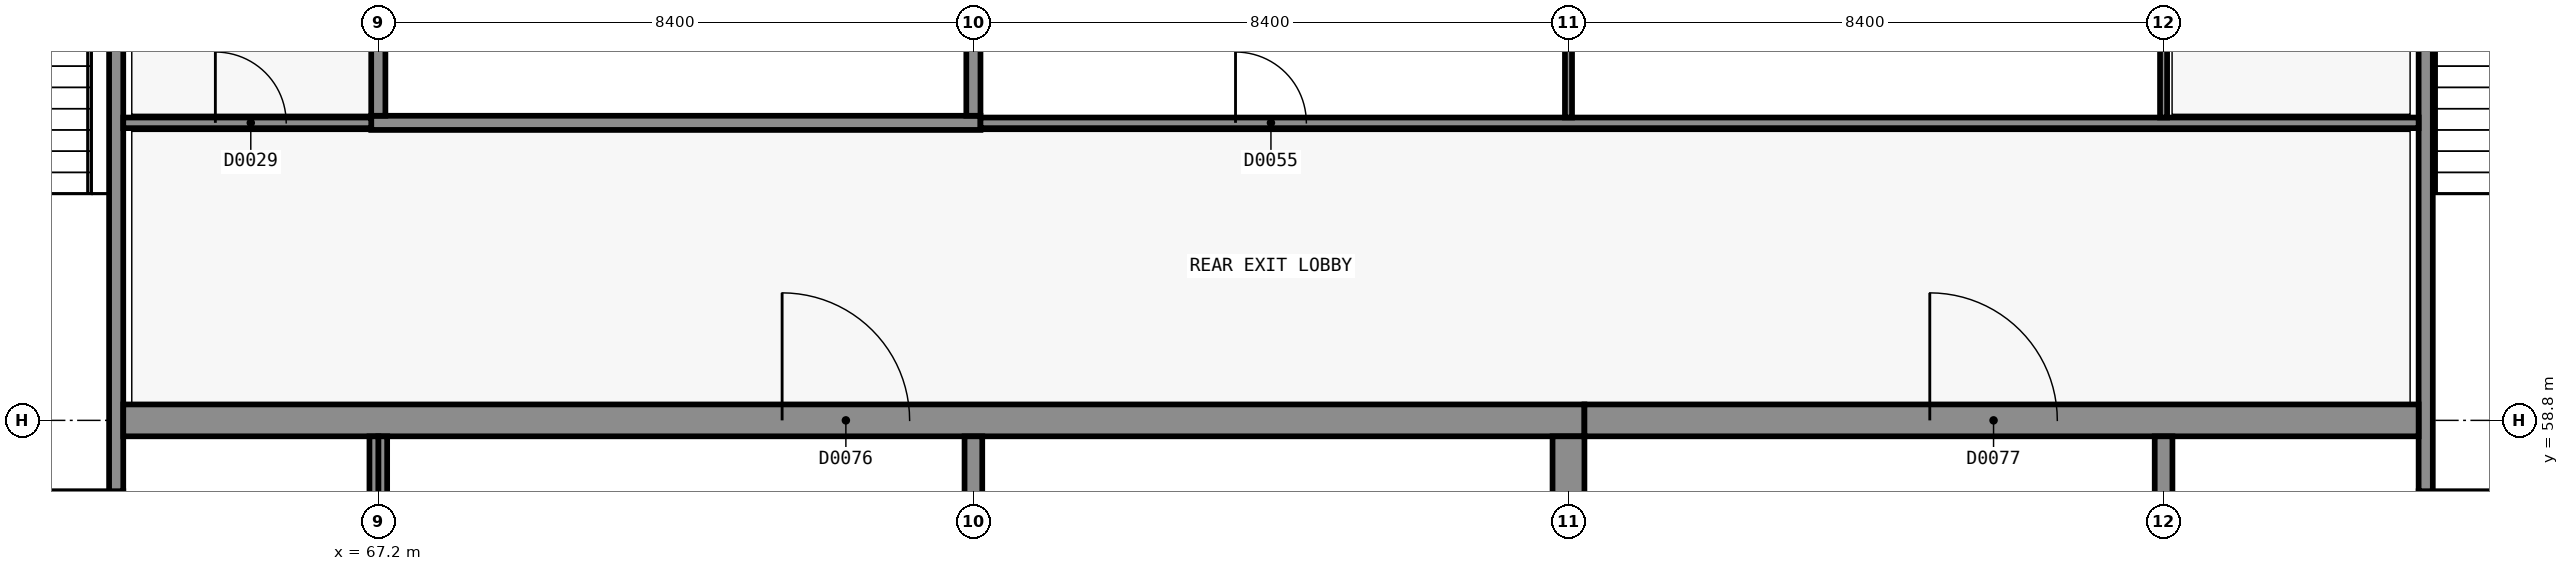
"""IFC4 building model, lengths in metres.
Left out: names, types, materials, properties, quantities, classifications, styles, units other than length and angle.
Written with IfcOpenShell. Run it as: python <this file> out.ifc"""

import sys

from ifc_helpers import new_model, si_unit, direction, frame, frame_2d, origin, place, context, subcontext, project, spatial, polyline, rectangle, outline, extrude, element, fill, save


model = new_model("IFC4")
c1 = context("Model", 3, precision=1e-05, world=origin(), true_north=direction((0.0, 1.0)))
c2 = subcontext(c1, "Body", "Model", "MODEL_VIEW")
j1 = project(units=[si_unit("LENGTHUNIT", "METRE"), si_unit("PLANEANGLEUNIT", "RADIAN")], contexts=[c1])
p1 = place(None, origin())
s1 = spatial("IfcSite", under=j1, at=p1, CompositionType="ELEMENT")
p2 = place(p1, origin())
s2 = spatial("IfcBuilding", under=s1, at=p2, CompositionType="ELEMENT")
p3 = place(p2, origin())
s3 = spatial("IfcBuildingStorey", under=s2, at=p3, CompositionType="ELEMENT", Elevation=0.0)
p4 = place(p3, frame((63.5, 67.0, -0.3), z_axis=(0.0, 0.0, 1.0), x_axis=(0.0, -1.0, 0.0)))
e1 = element("IfcWall", 1, at=p4, inside=s3, PredefinedType="SHEAR", context=c2, shape_type="SweptSolid", body=[
    extrude(rectangle(XDim=9.2, YDim=0.2, at=frame_2d((4.6, 0.0))), origin(), (0.0, 0.0, 1.0), 5.7),
])
p5 = place(p4, frame((0.95, 0.0, 0.3)))
e2 = element("IfcOpeningElement", 2, at=p5, cuts=e1, PredefinedType="OPENING", context=c2, shape_type="SweptSolid", body=[
    extrude(rectangle(XDim=1.2, YDim=2.1, at=frame_2d((0.6, 1.05))), frame((0.0, 0.11, 0.0), z_axis=(0.0, -1.0, 0.0), x_axis=(1.0, 0.0, 0.0)), (0.0, 0.0, 1.0), 0.22),
])
p6 = place(p3, frame((96.1, 57.8, -0.3), z_axis=(0.0, 0.0, 1.0), x_axis=(0.0, 1.0, 0.0)))
e3 = element("IfcWall", 3, at=p6, inside=s3, PredefinedType="SHEAR", context=c2, shape_type="SweptSolid", body=[
    extrude(rectangle(XDim=9.2, YDim=0.2, at=frame_2d((4.6, 0.0))), origin(), (0.0, 0.0, 1.0), 5.7),
])
p7 = place(p6, frame((7.05, 0.0, 0.3)))
e4 = element("IfcOpeningElement", 4, at=p7, cuts=e3, PredefinedType="OPENING", context=c2, shape_type="SweptSolid", body=[
    extrude(rectangle(XDim=1.2, YDim=2.1, at=frame_2d((0.6, 1.05))), frame((0.0, 0.11, 0.0), z_axis=(0.0, -1.0, 0.0), x_axis=(1.0, 0.0, 0.0)), (0.0, 0.0, 1.0), 0.22),
])
p8 = place(p3, frame((63.6, 58.8, -0.3), z_axis=(0.0, 0.0, 1.0), x_axis=(1.0, 0.0, 0.0)))
e5 = element("IfcWall", 5, at=p8, inside=s3, PredefinedType="SHEAR", context=c2, shape_type="SweptSolid", body=[
    extrude(rectangle(XDim=20.625, YDim=0.45, at=frame_2d((10.312, 0.0))), origin(), (0.0, 0.0, 1.0), 5.7),
])
p9 = place(p8, frame((9.3, 0.0, 0.3)))
e6 = element("IfcOpeningElement", 6, at=p9, cuts=e5, PredefinedType="OPENING", context=c2, shape_type="SweptSolid", body=[
    extrude(rectangle(XDim=1.8, YDim=2.1, at=frame_2d((0.9, 1.05))), frame((0.0, 0.235, 0.0), z_axis=(0.0, -1.0, 0.0), x_axis=(1.0, 0.0, 0.0)), (0.0, 0.0, 1.0), 0.47),
])
p10 = place(p3, frame((84.0, 58.575, -0.3), z_axis=(0.0, 0.0, 1.0), x_axis=(0.0, -1.0, 0.0)))
e7 = element("IfcWall", 7, at=p10, inside=s3, PredefinedType="SHEAR", context=c2, shape_type="SweptSolid", body=[
    extrude(rectangle(XDim=24.75, YDim=0.45, at=frame_2d((12.375, 0.0))), origin(), (0.0, 0.0, 1.0), 5.7),
])
p11 = place(p3, frame((84.225, 58.8, -0.3), z_axis=(0.0, 0.0, 1.0), x_axis=(1.0, 0.0, 0.0)))
e8 = element("IfcWall", 8, at=p11, inside=s3, PredefinedType="SHEAR", context=c2, shape_type="SweptSolid", body=[
    extrude(rectangle(XDim=11.775, YDim=0.45, at=frame_2d((5.887, 0.0))), origin(), (0.0, 0.0, 1.0), 5.7),
])
p12 = place(p11, frame((4.875, 0.0, 0.3)))
e9 = element("IfcOpeningElement", 9, at=p12, cuts=e8, PredefinedType="OPENING", context=c2, shape_type="SweptSolid", body=[
    extrude(rectangle(XDim=1.8, YDim=2.1, at=frame_2d((0.9, 1.05))), frame((0.0, 0.235, 0.0), z_axis=(0.0, -1.0, 0.0), x_axis=(1.0, 0.0, 0.0)), (0.0, 0.0, 1.0), 0.47),
])
p13 = place(p3, frame((67.262, 34.7, -0.3), z_axis=(0.0, 0.0, 1.0), x_axis=(0.0, 1.0, 0.0)))
e10 = element("IfcWall", 10, at=p13, inside=s3, PredefinedType="SOLIDWALL", context=c2, shape_type="SweptSolid", body=[
    extrude(outline(polyline([(0.0, 0.0), (23.875, 0.0), (23.875, 3.497), (0.0, 0.154), (0.0, 0.0)])), frame((0.0, 0.062, 0.0), z_axis=(0.0, -1.0, 0.0), x_axis=(1.0, 0.0, 0.0)), (0.0, 0.0, 1.0), 0.125),
])
p14 = place(p3, frame((67.137, 34.8, -0.3), z_axis=(0.0, 0.0, 1.0), x_axis=(0.0, 1.0, 0.0)))
e11 = element("IfcWall", 11, at=p14, inside=s3, PredefinedType="SOLIDWALL", context=c2, shape_type="SweptSolid", body=[
    extrude(outline(polyline([(0.0, 0.0), (23.775, 0.0), (23.775, 3.497), (0.0, 0.168), (0.0, 0.0)])), frame((0.0, 0.062, 0.0), z_axis=(0.0, -1.0, 0.0), x_axis=(1.0, 0.0, 0.0)), (0.0, 0.0, 1.0), 0.125),
])
for number, where, z_axis, x_axis in (
    (12, (75.6, 34.7, -0.3), (0.0, 0.0, 1.0), (0.0, 1.0, 0.0)),
    (13, (92.4, 34.7, -0.3), (0.0, 0.0, 1.0), (0.0, 1.0, 0.0)),
):
    element("IfcWall", number, at=place(p3, frame(where, z_axis=z_axis, x_axis=x_axis)), inside=s3, PredefinedType="SOLIDWALL", context=c2, shape_type="SweptSolid", body=[
        extrude(outline(polyline([(0.0, 0.0), (23.875, 0.0), (23.875, 3.497), (0.0, 0.154), (0.0, 0.0)])), frame((0.0, 0.125, 0.0), z_axis=(0.0, -1.0, 0.0), x_axis=(1.0, 0.0, 0.0)), (0.0, 0.0, 1.0), 0.25),
    ])
p15 = place(p3, frame((67.1, 63.0, 0.0), z_axis=(0.0, 0.0, 1.0), x_axis=(1.0, 0.0, 0.0)))
e14 = element("IfcWall", 14, at=p15, inside=s3, PredefinedType="SOLIDWALL", context=c2, shape_type="SweptSolid", body=[
    extrude(rectangle(XDim=8.6, YDim=0.2, at=frame_2d((4.3, 0.0))), origin(), (0.0, 0.0, 1.0), 4.4),
])
p16 = place(p3, frame((67.2, 63.1, 0.0), z_axis=(0.0, 0.0, 1.0), x_axis=(0.0, 1.0, 0.0)))
e15 = element("IfcWall", 15, at=p16, inside=s3, PredefinedType="SOLIDWALL", context=c2, shape_type="SweptSolid", body=[
    extrude(rectangle(XDim=3.5, YDim=0.2, at=frame_2d((1.75, 0.0))), origin(), (0.0, 0.0, 1.0), 4.4),
])
p17 = place(p16, frame((1.4, 0.0, 0.0)))
e16 = element("IfcOpeningElement", 16, at=p17, cuts=e15, PredefinedType="OPENING", context=c2, shape_type="SweptSolid", body=[
    extrude(rectangle(XDim=1.2, YDim=2.1, at=frame_2d((0.6, 1.05))), frame((0.0, 0.11, 0.0), z_axis=(0.0, -1.0, 0.0), x_axis=(1.0, 0.0, 0.0)), (0.0, 0.0, 1.0), 0.22),
])
p18 = place(p3, frame((75.6, 63.1, 0.0), z_axis=(0.0, 0.0, 1.0), x_axis=(0.0, 1.0, 0.0)))
e17 = element("IfcWall", 17, at=p18, inside=s3, PredefinedType="SOLIDWALL", context=c2, shape_type="SweptSolid", body=[
    extrude(rectangle(XDim=3.5, YDim=0.2, at=frame_2d((1.75, 0.0))), origin(), (0.0, 0.0, 1.0), 4.4),
])
p19 = place(p3, frame((63.6, 63.0, 0.0), z_axis=(0.0, 0.0, 1.0), x_axis=(1.0, 0.0, 0.0)))
e18 = element("IfcWall", 18, at=p19, inside=s3, PredefinedType="PARTITIONING", context=c2, shape_type="SweptSolid", body=[
    extrude(rectangle(XDim=3.5, YDim=0.15, at=frame_2d((1.75, 0.0))), origin(), (0.0, 0.0, 1.0), 4.4),
])
p20 = place(p19, frame((1.3, 0.0, 0.0)))
e19 = element("IfcOpeningElement", 19, at=p20, cuts=e18, PredefinedType="OPENING", context=c2, shape_type="SweptSolid", body=[
    extrude(rectangle(XDim=1.0, YDim=2.1, at=frame_2d((0.5, 1.05))), frame((0.0, 0.085, 0.0), z_axis=(0.0, -1.0, 0.0), x_axis=(1.0, 0.0, 0.0)), (0.0, 0.0, 1.0), 0.17),
])
p21 = place(p3, frame((75.7, 63.0, 0.0), z_axis=(0.0, 0.0, 1.0), x_axis=(1.0, 0.0, 0.0)))
e20 = element("IfcWall", 20, at=p21, inside=s3, PredefinedType="PARTITIONING", context=c2, shape_type="SweptSolid", body=[
    extrude(rectangle(XDim=20.3, YDim=0.15, at=frame_2d((10.15, 0.0))), origin(), (0.0, 0.0, 1.0), 4.4),
])
p22 = place(p21, frame((3.6, 0.0, 0.0)))
e21 = element("IfcOpeningElement", 21, at=p22, cuts=e20, PredefinedType="OPENING", context=c2, shape_type="SweptSolid", body=[
    extrude(rectangle(XDim=1.0, YDim=2.1, at=frame_2d((0.5, 1.05))), frame((0.0, 0.085, 0.0), z_axis=(0.0, -1.0, 0.0), x_axis=(1.0, 0.0, 0.0)), (0.0, 0.0, 1.0), 0.17),
])
p23 = place(p3, frame((84.0, 63.075, 0.0), z_axis=(0.0, 0.0, 1.0), x_axis=(0.0, 1.0, 0.0)))
e22 = element("IfcWall", 22, at=p23, inside=s3, PredefinedType="PARTITIONING", context=c2, shape_type="SweptSolid", body=[
    extrude(rectangle(XDim=3.525, YDim=0.1, at=frame_2d((1.763, 0.0))), origin(), (0.0, 0.0, 1.0), 4.4),
])
p24 = place(p3, frame((92.4, 63.075, 0.0), z_axis=(0.0, 0.0, 1.0), x_axis=(0.0, 1.0, 0.0)))
e23 = element("IfcWall", 23, at=p24, inside=s3, PredefinedType="PARTITIONING", context=c2, shape_type="SweptSolid", body=[
    extrude(rectangle(XDim=3.525, YDim=0.1, at=frame_2d((1.763, 0.0))), origin(), (0.0, 0.0, 1.0), 4.4),
])
p25 = place(p24, frame((1.575, 0.0, 0.0)))
e24 = element("IfcOpeningElement", 24, at=p25, cuts=e23, PredefinedType="OPENING", context=c2, shape_type="SweptSolid", body=[
    extrude(rectangle(XDim=0.9, YDim=2.1, at=frame_2d((0.45, 1.05))), frame((0.0, 0.06, 0.0), z_axis=(0.0, -1.0, 0.0), x_axis=(1.0, 0.0, 0.0)), (0.0, 0.0, 1.0), 0.12),
])
p26 = place(p20, origin())
e25 = element("IfcDoor", 25, at=p26, inside=s3, OperationType="SINGLE_SWING_RIGHT", PredefinedType="DOOR", context=c2, shape_type="SweptSolid", body=[
    extrude(rectangle(XDim=1.0, YDim=2.1, at=frame_2d((0.5, 1.05))), frame((0.0, 0.025, 0.0), z_axis=(0.0, -1.0, 0.0), x_axis=(1.0, 0.0, 0.0)), (0.0, 0.0, 1.0), 0.05),
])
fill(e19, e25)
p27 = place(p22, origin())
e26 = element("IfcDoor", 26, at=p27, inside=s3, OperationType="SINGLE_SWING_RIGHT", PredefinedType="DOOR", context=c2, shape_type="SweptSolid", body=[
    extrude(rectangle(XDim=1.0, YDim=2.1, at=frame_2d((0.5, 1.05))), frame((0.0, 0.025, 0.0), z_axis=(0.0, -1.0, 0.0), x_axis=(1.0, 0.0, 0.0)), (0.0, 0.0, 1.0), 0.05),
])
fill(e21, e26)
p28 = place(p9, origin())
e27 = element("IfcDoor", 27, at=p28, inside=s3, OperationType="DOUBLE_DOOR_SINGLE_SWING", PredefinedType="DOOR", context=c2, shape_type="SweptSolid", body=[
    extrude(rectangle(XDim=1.8, YDim=2.1, at=frame_2d((0.9, 1.05))), frame((0.0, 0.025, 0.0), z_axis=(0.0, -1.0, 0.0), x_axis=(1.0, 0.0, 0.0)), (0.0, 0.0, 1.0), 0.05),
])
fill(e6, e27)
p29 = place(p12, origin())
e28 = element("IfcDoor", 28, at=p29, inside=s3, OperationType="DOUBLE_DOOR_SINGLE_SWING", PredefinedType="DOOR", context=c2, shape_type="SweptSolid", body=[
    extrude(rectangle(XDim=1.8, YDim=2.1, at=frame_2d((0.9, 1.05))), frame((0.0, 0.025, 0.0), z_axis=(0.0, -1.0, 0.0), x_axis=(1.0, 0.0, 0.0)), (0.0, 0.0, 1.0), 0.05),
])
fill(e9, e28)
save(model, sys.argv[1])
